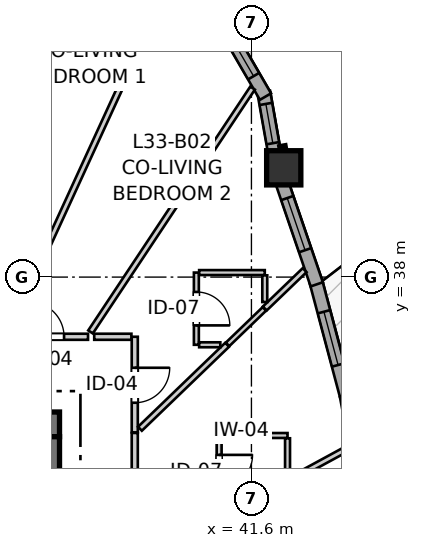
"""IFC4 building model, lengths in metres.
Left out: names, types, materials, properties, quantities, classifications, styles, units other than length and angle.
Written with IfcOpenShell. Run it as: python <this file> out.ifc"""

import sys

from ifc_helpers import new_model, si_unit, direction, frame, frame_2d, origin, origin_2d, place, context, subcontext, project, spatial, rectangle, extrude, source, transform, mapped, element, fill, save


model = new_model("IFC4")
c1 = context("Model", 3, precision=1e-05, world=origin(), true_north=direction((0.0, 1.0)))
c2 = subcontext(c1, "Body", "Model", "MODEL_VIEW")
j1 = project(units=[si_unit("LENGTHUNIT", "METRE"), si_unit("PLANEANGLEUNIT", "RADIAN")], contexts=[c1])
p1 = place(None, origin())
s1 = spatial("IfcSite", under=j1, at=p1, CompositionType="ELEMENT")
p2 = place(p1, origin())
s2 = spatial("IfcBuilding", under=s1, at=p2, CompositionType="ELEMENT")
p3 = place(p2, frame((0.0, 0.0, 112.0)))
s3 = spatial("IfcBuildingStorey", under=s2, at=p3, CompositionType="ELEMENT", Elevation=112.0)
p4 = place(p3, frame((36.55, 34.125, 0.0), z_axis=(0.0, 0.0, 1.0), x_axis=(-1.0, 0.0, 0.0)))
e1 = element("IfcWall", 1, at=p4, inside=s3, PredefinedType="SHEAR", context=c2, shape_type="SweptSolid", body=[
    extrude(rectangle(XDim=12.4, YDim=0.65, at=frame_2d((6.2, 0.0))), origin(), (0.0, 0.0, 1.0), 2.935),
])
p5 = place(p3, frame((36.225, 18.2, 0.0), z_axis=(0.0, 0.0, 1.0), x_axis=(0.0, 1.0, 0.0)))
e2 = element("IfcWall", 2, at=p5, inside=s3, PredefinedType="SHEAR", context=c2, shape_type="SweptSolid", body=[
    extrude(rectangle(XDim=15.6, YDim=0.65, at=frame_2d((7.8, 0.0))), origin(), (0.0, 0.0, 1.0), 2.935),
])
p6 = place(p5, frame((4.25, 0.0, 0.0)))
e3 = element("IfcOpeningElement", 3, at=p6, cuts=e2, PredefinedType="OPENING", context=c2, shape_type="SweptSolid", body=[
    extrude(rectangle(XDim=1.1, YDim=2.15, at=frame_2d((0.55, 1.075))), frame((0.0, 0.335, 0.0), z_axis=(0.0, -1.0, 0.0), x_axis=(1.0, 0.0, 0.0)), (0.0, 0.0, 1.0), 0.67),
])
p7 = place(p5, frame((10.25, 0.0, 0.0)))
e4 = element("IfcOpeningElement", 4, at=p7, cuts=e2, PredefinedType="OPENING", context=c2, shape_type="SweptSolid", body=[
    extrude(rectangle(XDim=1.1, YDim=2.15, at=frame_2d((0.55, 1.075))), frame((0.0, 0.335, 0.0), z_axis=(0.0, -1.0, 0.0), x_axis=(1.0, 0.0, 0.0)), (0.0, 0.0, 1.0), 0.67),
])
m1 = source(origin(), c2, "Body", "SweptSolid", [
    extrude(rectangle(XDim=0.9, YDim=0.9, at=origin_2d()), origin(), (0.0, 0.0, 1.0), 2.935),
])
p8 = place(p3, frame((42.45, 40.875, 0.0), z_axis=(0.0, 0.0, 1.0), x_axis=(1.0, 0.0, 0.0)))
e5 = element("IfcColumn", 5, at=p8, inside=s3, PredefinedType="COLUMN", context=c2, shape_type="MappedRepresentation", body=[
    mapped(m1, transform((0.0, 0.0, 0.0), x_axis=(1.0, 0.0, 0.0), y_axis=(0.0, 1.0, 0.0), z_axis=(0.0, 0.0, 1.0), scale=1.0)),
])
p9 = place(p3, frame((44.664, 31.881, 0.0), z_axis=(0.0, 0.0, 1.0), x_axis=(-0.18665909876, 0.982424745642, 0.0)))
e6 = element("IfcWall", 6, at=p9, inside=s3, PredefinedType="SOLIDWALL", context=c2, shape_type="SweptSolid", body=[
    extrude(rectangle(XDim=3.046, YDim=0.34, at=frame_2d((1.523, 0.0))), origin(), (0.0, 0.0, 1.0), 2.465),
])
p10 = place(p9, frame((0.416, 0.0, 0.82)))
e7 = element("IfcOpeningElement", 7, at=p10, cuts=e6, PredefinedType="OPENING", context=c2, shape_type="SweptSolid", body=[
    extrude(rectangle(XDim=0.95, YDim=1.35, at=frame_2d((0.475, 0.675))), frame((0.0, 0.18, 0.0), z_axis=(0.0, -1.0, 0.0), x_axis=(1.0, 0.0, 0.0)), (0.0, 0.0, 1.0), 0.36),
])
p11 = place(p9, frame((2.054, 0.0, 0.82)))
e8 = element("IfcOpeningElement", 8, at=p11, cuts=e6, PredefinedType="OPENING", context=c2, shape_type="SweptSolid", body=[
    extrude(rectangle(XDim=0.58, YDim=1.35, at=frame_2d((0.29, 0.675))), frame((0.0, 0.18, 0.0), z_axis=(0.0, -1.0, 0.0), x_axis=(1.0, 0.0, 0.0)), (0.0, 0.0, 1.0), 0.36),
])
p12 = place(p3, frame((44.09, 34.901, 0.0), z_axis=(0.0, 0.0, 1.0), x_axis=(-0.257108087637, 0.966382652613, 0.0)))
e9 = element("IfcWall", 9, at=p12, inside=s3, PredefinedType="SOLIDWALL", context=c2, shape_type="SweptSolid", body=[
    extrude(rectangle(XDim=3.096, YDim=0.34, at=frame_2d((1.548, 0.0))), origin(), (0.0, 0.0, 1.0), 2.465),
])
p13 = place(p12, frame((0.813, 0.0, 0.82)))
e10 = element("IfcOpeningElement", 10, at=p13, cuts=e9, PredefinedType="OPENING", context=c2, shape_type="SweptSolid", body=[
    extrude(rectangle(XDim=1.45, YDim=1.25, at=frame_2d((0.725, 0.625))), frame((0.0, 0.18, 0.0), z_axis=(0.0, -1.0, 0.0), x_axis=(1.0, 0.0, 0.0)), (0.0, 0.0, 1.0), 0.36),
])
p14 = place(p3, frame((43.319, 37.809, 0.0), z_axis=(0.0, 0.0, 1.0), x_axis=(-0.323586371726, 0.946198636669, 0.0)))
e11 = element("IfcWall", 11, at=p14, inside=s3, PredefinedType="SOLIDWALL", context=c2, shape_type="SweptSolid", body=[
    extrude(rectangle(XDim=2.952, YDim=0.34, at=frame_2d((1.476, 0.0))), origin(), (0.0, 0.0, 1.0), 2.465),
])
p15 = place(p14, frame((0.949, 0.0, 0.82)))
e12 = element("IfcOpeningElement", 12, at=p15, cuts=e11, PredefinedType="OPENING", context=c2, shape_type="SweptSolid", body=[
    extrude(rectangle(XDim=1.45, YDim=1.25, at=frame_2d((0.725, 0.625))), frame((0.0, 0.18, 0.0), z_axis=(0.0, -1.0, 0.0), x_axis=(1.0, 0.0, 0.0)), (0.0, 0.0, 1.0), 0.36),
])
p16 = place(p3, frame((42.242, 41.072, 0.0), z_axis=(0.0, 0.0, 1.0), x_axis=(-0.17440141227, 0.984674640375, 0.0)))
e13 = element("IfcWall", 13, at=p16, inside=s3, PredefinedType="SOLIDWALL", context=c2, shape_type="SweptSolid", body=[
    extrude(rectangle(XDim=1.831, YDim=0.34, at=frame_2d((0.916, 0.0))), origin(), (0.0, 0.0, 1.0), 2.465),
])
p17 = place(p16, frame((0.457, 0.0, 0.82)))
e14 = element("IfcOpeningElement", 14, at=p17, cuts=e13, PredefinedType="OPENING", context=c2, shape_type="SweptSolid", body=[
    extrude(rectangle(XDim=1.05, YDim=1.45, at=frame_2d((0.525, 0.725))), frame((0.0, 0.18, 0.0), z_axis=(0.0, -1.0, 0.0), x_axis=(1.0, 0.0, 0.0)), (0.0, 0.0, 1.0), 0.36),
])
p18 = place(p3, frame((41.969, 42.749, 0.0), z_axis=(0.0, 0.0, 1.0), x_axis=(-0.501989603552, 0.864873654313, 0.0)))
e15 = element("IfcWall", 15, at=p18, inside=s3, PredefinedType="SOLIDWALL", context=c2, shape_type="SweptSolid", body=[
    extrude(rectangle(XDim=2.099, YDim=0.34, at=frame_2d((1.05, 0.0))), origin(), (0.0, 0.0, 1.0), 2.465),
])
p19 = place(p18, frame((0.622, 0.0, 0.82)))
e16 = element("IfcOpeningElement", 16, at=p19, cuts=e15, PredefinedType="OPENING", context=c2, shape_type="SweptSolid", body=[
    extrude(rectangle(XDim=1.15, YDim=1.2, at=frame_2d((0.575, 0.6))), frame((0.0, 0.18, 0.0), z_axis=(0.0, -1.0, 0.0), x_axis=(1.0, 0.0, 0.0)), (0.0, 0.0, 1.0), 0.36),
])
p20 = place(p3, frame((38.53, 33.899, 0.0), z_axis=(0.0, 0.0, 1.0), x_axis=(0.0, -1.0, 0.0)))
e17 = element("IfcWall", 17, at=p20, inside=s3, PredefinedType="PARTITIONING", context=c2, shape_type="SweptSolid", body=[
    extrude(rectangle(XDim=3.469, YDim=0.16, at=frame_2d((1.734, 0.0))), origin(), (0.0, 0.0, 1.0), 2.935),
])
p21 = place(p20, frame((1.277, 0.0, 0.0)))
e18 = element("IfcOpeningElement", 18, at=p21, cuts=e17, PredefinedType="OPENING", context=c2, shape_type="SweptSolid", body=[
    extrude(rectangle(XDim=0.92, YDim=2.1, at=frame_2d((0.46, 1.05))), frame((0.0, 0.09, 0.0), z_axis=(0.0, -1.0, 0.0), x_axis=(1.0, 0.0, 0.0)), (0.0, 0.0, 1.0), 0.18),
])
p22 = place(p3, frame((38.53, 36.43, 0.0), z_axis=(0.0, 0.0, 1.0), x_axis=(0.0, -1.0, 0.0)))
e19 = element("IfcWall", 19, at=p22, inside=s3, PredefinedType="PARTITIONING", context=c2, shape_type="SweptSolid", body=[
    extrude(rectangle(XDim=2.516, YDim=0.16, at=frame_2d((1.258, 0.0))), origin(), (0.0, 0.0, 1.0), 2.573),
])
p23 = place(p22, frame((0.816, 0.0, 0.0)))
e20 = element("IfcOpeningElement", 20, at=p23, cuts=e19, PredefinedType="OPENING", context=c2, shape_type="SweptSolid", body=[
    extrude(rectangle(XDim=0.92, YDim=2.1, at=frame_2d((0.46, 1.05))), frame((0.0, 0.09, 0.0), z_axis=(0.0, -1.0, 0.0), x_axis=(1.0, 0.0, 0.0)), (0.0, 0.0, 1.0), 0.18),
])
p24 = place(p3, frame((35.121, 36.43, 0.0), z_axis=(0.0, 0.0, 1.0), x_axis=(1.0, 0.0, 0.0)))
e21 = element("IfcWall", 21, at=p24, inside=s3, PredefinedType="PARTITIONING", context=c2, shape_type="SweptSolid", body=[
    extrude(rectangle(XDim=2.179, YDim=0.16, at=frame_2d((1.089, 0.0))), origin(), (0.0, 0.0, 1.0), 2.573),
])
p25 = place(p24, frame((0.628, 0.0, 0.0)))
e22 = element("IfcOpeningElement", 22, at=p25, cuts=e21, PredefinedType="OPENING", context=c2, shape_type="SweptSolid", body=[
    extrude(rectangle(XDim=0.92, YDim=2.1, at=frame_2d((0.46, 1.05))), frame((0.0, 0.09, 0.0), z_axis=(0.0, -1.0, 0.0), x_axis=(1.0, 0.0, 0.0)), (0.0, 0.0, 1.0), 0.18),
])
p26 = place(p3, frame((40.75, 33.832, 0.0), z_axis=(0.0, 0.0, 1.0), x_axis=(0.0, -1.0, 0.0)))
e23 = element("IfcWall", 23, at=p26, inside=s3, PredefinedType="PARTITIONING", context=c2, shape_type="SweptSolid", body=[
    extrude(rectangle(XDim=1.9, YDim=0.13, at=frame_2d((0.95, 0.0))), origin(), (0.0, 0.0, 1.0), 2.935),
])
p27 = place(p26, frame((0.51, 0.0, 0.0)))
e24 = element("IfcOpeningElement", 24, at=p27, cuts=e23, PredefinedType="OPENING", context=c2, shape_type="SweptSolid", body=[
    extrude(rectangle(XDim=0.88, YDim=2.05, at=frame_2d((0.44, 1.025))), frame((0.0, 0.075, 0.0), z_axis=(0.0, -1.0, 0.0), x_axis=(1.0, 0.0, 0.0)), (0.0, 0.0, 1.0), 0.15),
])
p28 = place(p3, frame((40.151, 38.119, 0.0), z_axis=(0.0, 0.0, 1.0), x_axis=(0.0, -1.0, 0.0)))
e25 = element("IfcWall", 25, at=p28, inside=s3, PredefinedType="PARTITIONING", context=c2, shape_type="SweptSolid", body=[
    extrude(rectangle(XDim=1.9, YDim=0.13, at=frame_2d((0.95, 0.0))), origin(), (0.0, 0.0, 1.0), 2.935),
])
p29 = place(p28, frame((0.51, 0.0, 0.0)))
e26 = element("IfcOpeningElement", 26, at=p29, cuts=e25, PredefinedType="OPENING", context=c2, shape_type="SweptSolid", body=[
    extrude(rectangle(XDim=0.88, YDim=2.05, at=frame_2d((0.44, 1.025))), frame((0.0, 0.075, 0.0), z_axis=(0.0, -1.0, 0.0), x_axis=(1.0, 0.0, 0.0)), (0.0, 0.0, 1.0), 0.15),
])
p30 = place(p3, frame((35.191, 36.548, 0.0), z_axis=(0.0, 0.0, 1.0), x_axis=(0.417154036681, 0.908835799075, 0.0)))
e27 = element("IfcWall", 27, at=p30, inside=s3, PredefinedType="PARTITIONING", context=c2, shape_type="SweptSolid", body=[
    extrude(rectangle(XDim=9.949, YDim=0.145, at=frame_2d((4.974, 0.0))), origin(), (0.0, 0.0, 1.0), 2.935),
])
p31 = place(p3, frame((37.366, 36.557, 0.0), z_axis=(0.0, 0.0, 1.0), x_axis=(0.553463679146, 0.832873313215, 0.0)))
e28 = element("IfcWall", 28, at=p31, inside=s3, PredefinedType="PARTITIONING", context=c2, shape_type="SweptSolid", body=[
    extrude(rectangle(XDim=7.704, YDim=0.145, at=frame_2d((3.852, 0.0))), origin(), (0.0, 0.0, 1.0), 2.935),
])
p32 = place(p3, frame((38.666, 34.009, 0.0), z_axis=(0.0, 0.0, 1.0), x_axis=(0.72031454127, 0.693647577402, 0.0)))
e29 = element("IfcWall", 29, at=p32, inside=s3, PredefinedType="PARTITIONING", context=c2, shape_type="SweptSolid", body=[
    extrude(rectangle(XDim=3.186, YDim=0.145, at=frame_2d((1.593, 0.0))), origin(), (0.0, 0.0, 1.0), 2.935),
])
p33 = place(p3, frame((42.535, 32.624, 0.0), z_axis=(0.0, 0.0, 1.0), x_axis=(0.878631690287, 0.477500107669, 0.0)))
e30 = element("IfcWall", 30, at=p33, inside=s3, PredefinedType="PARTITIONING", context=c2, shape_type="SweptSolid", body=[
    extrude(rectangle(XDim=1.861, YDim=0.145, at=frame_2d((0.93, 0.0))), origin(), (0.0, 0.0, 1.0), 2.935),
])
p34 = place(p3, frame((40.224, 38.119, 0.0), z_axis=(0.0, 0.0, 1.0), x_axis=(1.0, 0.0, 0.0)))
e31 = element("IfcWall", 31, at=p34, inside=s3, PredefinedType="PARTITIONING", context=c2, shape_type="SweptSolid", body=[
    extrude(rectangle(XDim=1.727, YDim=0.13, at=frame_2d((0.863, 0.0))), origin(), (0.0, 0.0, 1.0), 2.935),
])
p35 = place(p3, frame((40.823, 33.832, 0.0), z_axis=(0.0, 0.0, 1.0), x_axis=(1.0, 0.0, 0.0)))
e32 = element("IfcWall", 32, at=p35, inside=s3, PredefinedType="PARTITIONING", context=c2, shape_type="SweptSolid", body=[
    extrude(rectangle(XDim=1.727, YDim=0.13, at=frame_2d((0.864, 0.0))), origin(), (0.0, 0.0, 1.0), 2.935),
])
p36 = place(p3, frame((41.951, 37.173, 0.0), z_axis=(0.0, 0.0, 1.0), x_axis=(0.720559112487, 0.693393514111, 0.0)))
e33 = element("IfcWall", 33, at=p36, inside=s3, PredefinedType="PARTITIONING", context=c2, shape_type="SweptSolid", body=[
    extrude(rectangle(XDim=1.456, YDim=0.145, at=frame_2d((0.728, 0.0))), origin(), (0.0, 0.0, 1.0), 2.935),
])
p37 = place(p3, frame((40.972, 36.229, 0.0), z_axis=(0.0, 0.0, 1.0), x_axis=(0.72014550452, 0.693823069896, 0.0)))
e34 = element("IfcWall", 34, at=p37, inside=s3, PredefinedType="PARTITIONING", context=c2, shape_type="SweptSolid", body=[
    extrude(rectangle(XDim=1.345, YDim=0.13, at=frame_2d((0.672, 0.0))), origin(), (0.0, 0.0, 1.0), 2.935),
])
p38 = place(p3, frame((37.463, 36.43, 0.0), z_axis=(0.0, 0.0, 1.0), x_axis=(1.0, 0.0, 0.0)))
e35 = element("IfcWall", 35, at=p38, inside=s3, PredefinedType="PARTITIONING", context=c2, shape_type="SweptSolid", body=[
    extrude(rectangle(XDim=0.979, YDim=0.16, at=frame_2d((0.489, 0.0))), origin(), (0.0, 0.0, 1.0), 2.573),
])
p39 = place(p3, frame((42.55, 32.758, 0.0), z_axis=(0.0, 0.0, 1.0), x_axis=(0.0, 1.0, 0.0)))
e36 = element("IfcWall", 36, at=p39, inside=s3, PredefinedType="PARTITIONING", context=c2, shape_type="SweptSolid", body=[
    extrude(rectangle(XDim=1.001, YDim=0.13, at=frame_2d((0.5, 0.0))), origin(), (0.0, 0.0, 1.0), 2.935),
])
p40 = place(p3, frame((41.951, 37.344, 0.0), z_axis=(0.0, 0.0, 1.0), x_axis=(0.0, 1.0, 0.0)))
e37 = element("IfcWall", 37, at=p40, inside=s3, PredefinedType="PARTITIONING", context=c2, shape_type="SweptSolid", body=[
    extrude(rectangle(XDim=0.702, YDim=0.13, at=frame_2d((0.351, 0.0))), origin(), (0.0, 0.0, 1.0), 2.935),
])
p41 = place(p3, frame((40.224, 36.219, 0.0), z_axis=(0.0, 0.0, 1.0), x_axis=(1.0, 0.0, 0.0)))
e38 = element("IfcWall", 38, at=p41, inside=s3, PredefinedType="PARTITIONING", context=c2, shape_type="SweptSolid", body=[
    extrude(rectangle(XDim=0.557, YDim=0.13, at=frame_2d((0.278, 0.0))), origin(), (0.0, 0.0, 1.0), 2.935),
])
m2 = source(origin(), c2, "Body", "SweptSolid", [
    extrude(rectangle(XDim=1.45, YDim=1.25, at=frame_2d((0.725, 0.625))), frame((0.0, 0.03, 0.0), z_axis=(0.0, -1.0, 0.0), x_axis=(1.0, 0.0, 0.0)), (0.0, 0.0, 1.0), 0.06),
])
p42 = place(p13, origin())
e39 = element("IfcWindow", 39, at=p42, inside=s3, PartitioningType="SINGLE_PANEL", PredefinedType="WINDOW", context=c2, shape_type="MappedRepresentation", body=[
    mapped(m2, transform((0.0, 0.0, 0.0), x_axis=(1.0, 0.0, 0.0), y_axis=(0.0, 1.0, 0.0), z_axis=(0.0, 0.0, 1.0), scale=1.0)),
])
fill(e10, e39)
p43 = place(p15, origin())
e40 = element("IfcWindow", 40, at=p43, inside=s3, PartitioningType="SINGLE_PANEL", PredefinedType="WINDOW", context=c2, shape_type="MappedRepresentation", body=[
    mapped(m2, transform((0.0, 0.0, 0.0), x_axis=(1.0, 0.0, 0.0), y_axis=(0.0, 1.0, 0.0), z_axis=(0.0, 0.0, 1.0), scale=1.0)),
])
fill(e12, e40)
m3 = source(origin(), c2, "Body", "SweptSolid", [
    extrude(rectangle(XDim=1.05, YDim=1.45, at=frame_2d((0.525, 0.725))), frame((0.0, 0.03, 0.0), z_axis=(0.0, -1.0, 0.0), x_axis=(1.0, 0.0, 0.0)), (0.0, 0.0, 1.0), 0.06),
])
p44 = place(p17, origin())
e41 = element("IfcWindow", 41, at=p44, inside=s3, PartitioningType="SINGLE_PANEL", PredefinedType="WINDOW", context=c2, shape_type="MappedRepresentation", body=[
    mapped(m3, transform((0.0, 0.0, 0.0), x_axis=(1.0, 0.0, 0.0), y_axis=(0.0, 1.0, 0.0), z_axis=(0.0, 0.0, 1.0), scale=1.0)),
])
fill(e14, e41)
m4 = source(origin(), c2, "Body", "SweptSolid", [
    extrude(rectangle(XDim=1.15, YDim=1.2, at=frame_2d((0.575, 0.6))), frame((0.0, 0.03, 0.0), z_axis=(0.0, -1.0, 0.0), x_axis=(1.0, 0.0, 0.0)), (0.0, 0.0, 1.0), 0.06),
])
p45 = place(p19, origin())
e42 = element("IfcWindow", 42, at=p45, inside=s3, PartitioningType="SINGLE_PANEL", PredefinedType="WINDOW", context=c2, shape_type="MappedRepresentation", body=[
    mapped(m4, transform((0.0, 0.0, 0.0), x_axis=(1.0, 0.0, 0.0), y_axis=(0.0, 1.0, 0.0), z_axis=(0.0, 0.0, 1.0), scale=1.0)),
])
fill(e16, e42)
m5 = source(origin(), c2, "Body", "SweptSolid", [
    extrude(rectangle(XDim=0.92, YDim=2.1, at=frame_2d((0.46, 1.05))), frame((0.0, 0.025, 0.0), z_axis=(0.0, -1.0, 0.0), x_axis=(1.0, 0.0, 0.0)), (0.0, 0.0, 1.0), 0.05),
])
p46 = place(p23, origin())
e43 = element("IfcDoor", 43, at=p46, inside=s3, OperationType="SINGLE_SWING_LEFT", PredefinedType="DOOR", context=c2, shape_type="MappedRepresentation", body=[
    mapped(m5, transform((0.0, 0.0, 0.0), x_axis=(1.0, 0.0, 0.0), y_axis=(0.0, 1.0, 0.0), z_axis=(0.0, 0.0, 1.0), scale=1.0)),
])
fill(e20, e43)
p47 = place(p25, origin())
e44 = element("IfcDoor", 44, at=p47, inside=s3, OperationType="SINGLE_SWING_LEFT", PredefinedType="DOOR", context=c2, shape_type="MappedRepresentation", body=[
    mapped(m5, transform((0.0, 0.0, 0.0), x_axis=(1.0, 0.0, 0.0), y_axis=(0.0, 1.0, 0.0), z_axis=(0.0, 0.0, 1.0), scale=1.0)),
])
fill(e22, e44)
m6 = source(origin(), c2, "Body", "SweptSolid", [
    extrude(rectangle(XDim=0.88, YDim=2.05, at=frame_2d((0.44, 1.025))), frame((0.0, 0.025, 0.0), z_axis=(0.0, -1.0, 0.0), x_axis=(1.0, 0.0, 0.0)), (0.0, 0.0, 1.0), 0.05),
])
p48 = place(p27, origin())
e45 = element("IfcDoor", 45, at=p48, inside=s3, OperationType="SINGLE_SWING_LEFT", PredefinedType="DOOR", context=c2, shape_type="MappedRepresentation", body=[
    mapped(m6, transform((0.0, 0.0, 0.0), x_axis=(1.0, 0.0, 0.0), y_axis=(0.0, 1.0, 0.0), z_axis=(0.0, 0.0, 1.0), scale=1.0)),
])
fill(e24, e45)
p49 = place(p29, origin())
e46 = element("IfcDoor", 46, at=p49, inside=s3, OperationType="SINGLE_SWING_RIGHT", PredefinedType="DOOR", context=c2, shape_type="MappedRepresentation", body=[
    mapped(m6, transform((0.0, 0.0, 0.0), x_axis=(1.0, 0.0, 0.0), y_axis=(0.0, 1.0, 0.0), z_axis=(0.0, 0.0, 1.0), scale=1.0)),
])
fill(e26, e46)
save(model, sys.argv[1])
